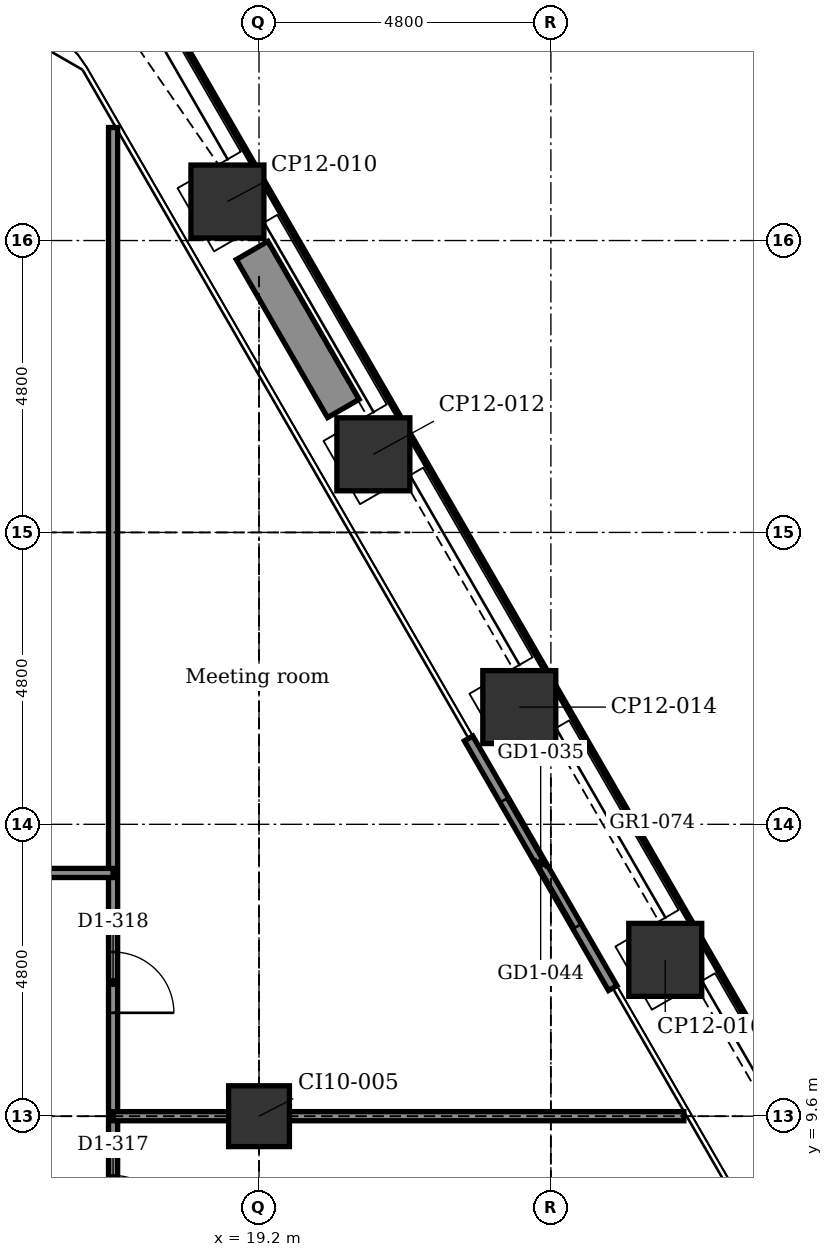
"""IFC4 building model, lengths in metres.
Left out: names, types, materials, properties, quantities, classifications, styles, units other than length and angle.
Written with IfcOpenShell. Run it as: python <this file> out.ifc"""

import sys

from ifc_helpers import new_model, si_unit, direction, frame, frame_2d, origin, origin_2d, place, context, subcontext, project, spatial, rectangle, extrude, element, fill, save


model = new_model("IFC4")
c1 = context("Model", 3, precision=1e-05, world=origin(), true_north=direction((0.0, 1.0)))
c2 = subcontext(c1, "Body", "Model", "MODEL_VIEW")
j1 = project(units=[si_unit("LENGTHUNIT", "METRE"), si_unit("PLANEANGLEUNIT", "RADIAN")], contexts=[c1])
p1 = place(None, origin())
s1 = spatial("IfcSite", under=j1, at=p1, CompositionType="ELEMENT")
p2 = place(p1, origin())
s2 = spatial("IfcBuilding", under=s1, at=p2, CompositionType="ELEMENT")
p3 = place(p2, frame((0.0, 0.0, 113.9)))
s3 = spatial("IfcBuildingStorey", under=s2, at=p3, CompositionType="ELEMENT", Elevation=113.9)
for number, where, z_axis, x_axis in (
    (1, (18.68, 24.642, -0.2), (0.0, 0.0, 1.0), (0.866, 0.5, 0.0)),
    (2, (21.08, 20.485, -0.2), (0.0, 0.0, 1.0), (0.866, 0.5, 0.0)),
    (3, (23.48, 16.328, -0.2), (0.0, 0.0, 1.0), (0.866, 0.5, 0.0)),
    (4, (25.88, 12.171, -0.2), (0.0, 0.0, 1.0), (0.866, 0.5, 0.0)),
):
    element("IfcColumn", number, at=place(p3, frame(where, z_axis=z_axis, x_axis=x_axis)), inside=s3, PredefinedType="COLUMN", context=c2, shape_type="SweptSolid", body=[
        extrude(rectangle(XDim=1.2, YDim=1.2, at=origin_2d()), origin(), (0.0, 0.0, 1.0), 4.5),
    ])
p4 = place(p3, frame((19.2, 9.6, -0.2), z_axis=(0.0, 0.0, 1.0), x_axis=(1.0, 0.0, 0.0)))
e5 = element("IfcColumn", 5, at=p4, inside=s3, PredefinedType="COLUMN", context=c2, shape_type="SweptSolid", body=[
    extrude(rectangle(XDim=1.0, YDim=1.0, at=origin_2d()), origin(), (0.0, 0.0, 1.0), 4.5),
])
p5 = place(p3, frame((22.647, 15.812, 0.0), z_axis=(0.0, 0.0, 1.0), x_axis=(0.499978080042, -0.866038058908, 0.0)))
e6 = element("IfcWall", 6, at=p5, inside=s3, PredefinedType="PARTITIONING", context=c2, shape_type="SweptSolid", body=[
    extrude(rectangle(XDim=4.74, YDim=0.16, at=frame_2d((2.37, 0.0))), origin(), (0.0, 0.0, 1.0), 4.3),
])
p6 = place(p5, frame((1.17, 0.0, 0.0)))
e7 = element("IfcOpeningElement", 7, at=p6, cuts=e6, PredefinedType="OPENING", context=c2, shape_type="SweptSolid", body=[
    extrude(rectangle(XDim=2.4, YDim=2.4, at=frame_2d((1.2, 1.2))), frame((0.0, 0.09, 0.0), z_axis=(0.0, -1.0, 0.0), x_axis=(1.0, 0.0, 0.0)), (0.0, 0.0, 1.0), 0.18),
])
p7 = place(p3, frame((19.087, 23.837, 0.0), z_axis=(0.0, 0.0, 1.0), x_axis=(0.499990139034, -0.866031096941, 0.0)))
e8 = element("IfcWall", 8, at=p7, inside=s3, PredefinedType="USERDEFINED", context=c2, shape_type="SweptSolid", body=[
    extrude(rectangle(XDim=3.0, YDim=0.6, at=frame_2d((1.5, 0.0))), origin(), (0.0, 0.0, 1.0), 0.7),
])
p8 = place(p3, frame((16.8, 3.95, 0.0), z_axis=(0.0, 0.0, 1.0), x_axis=(0.0, 1.0, 0.0)))
e9 = element("IfcWall", 9, at=p8, inside=s3, PredefinedType="PARTITIONING", context=c2, shape_type="SweptSolid", body=[
    extrude(rectangle(XDim=21.908, YDim=0.15, at=frame_2d((10.954, 0.0))), origin(), (0.0, 0.0, 1.0), 4.3),
])
p9 = place(p8, frame((0.95, 0.0, 0.0)))
e10 = element("IfcOpeningElement", 10, at=p9, cuts=e9, PredefinedType="OPENING", context=c2, shape_type="SweptSolid", body=[
    extrude(rectangle(XDim=1.0, YDim=2.1, at=frame_2d((0.5, 1.05))), frame((0.0, 0.085, 0.0), z_axis=(0.0, -1.0, 0.0), x_axis=(1.0, 0.0, 0.0)), (0.0, 0.0, 1.0), 0.17),
])
p10 = place(p8, frame((3.675, 0.0, 0.0)))
e11 = element("IfcOpeningElement", 11, at=p10, cuts=e9, PredefinedType="OPENING", context=c2, shape_type="SweptSolid", body=[
    extrude(rectangle(XDim=1.0, YDim=2.1, at=frame_2d((0.5, 1.05))), frame((0.0, 0.085, 0.0), z_axis=(0.0, -1.0, 0.0), x_axis=(1.0, 0.0, 0.0)), (0.0, 0.0, 1.0), 0.17),
])
p11 = place(p8, frame((7.35, 0.0, 0.0)))
e12 = element("IfcOpeningElement", 12, at=p11, cuts=e9, PredefinedType="OPENING", context=c2, shape_type="SweptSolid", body=[
    extrude(rectangle(XDim=1.0, YDim=2.1, at=frame_2d((0.5, 1.05))), frame((0.0, 0.085, 0.0), z_axis=(0.0, -1.0, 0.0), x_axis=(1.0, 0.0, 0.0)), (0.0, 0.0, 1.0), 0.17),
])
p12 = place(p3, frame((16.8, 9.6, 0.0), z_axis=(0.0, 0.0, 1.0), x_axis=(1.0, 0.0, 0.0)))
e13 = element("IfcWall", 13, at=p12, inside=s3, PredefinedType="PARTITIONING", context=c2, shape_type="SweptSolid", body=[
    extrude(rectangle(XDim=1.9, YDim=0.15, at=frame_2d((0.95, 0.0))), origin(), (0.0, 0.0, 1.0), 3.692),
])
p13 = place(p3, frame((19.7, 9.6, 0.0), z_axis=(0.0, 0.0, 1.0), x_axis=(1.0, 0.0, 0.0)))
e14 = element("IfcWall", 14, at=p13, inside=s3, PredefinedType="PARTITIONING", context=c2, shape_type="SweptSolid", body=[
    extrude(rectangle(XDim=6.487, YDim=0.15, at=frame_2d((3.243, 0.0))), origin(), (0.0, 0.0, 1.0), 3.692),
])
p14 = place(p3, frame((-16.8, 13.6, 0.0), z_axis=(0.0, 0.0, 1.0), x_axis=(1.0, 0.0, 0.0)))
e15 = element("IfcWall", 15, at=p14, inside=s3, PredefinedType="PARTITIONING", context=c2, shape_type="SweptSolid", body=[
    extrude(rectangle(XDim=33.6, YDim=0.15, at=frame_2d((16.8, 0.0))), origin(), (0.0, 0.0, 1.0), 4.3),
])
p15 = place(p14, frame((3.1, 0.0, 0.0)))
e16 = element("IfcOpeningElement", 16, at=p15, cuts=e15, PredefinedType="OPENING", context=c2, shape_type="SweptSolid", body=[
    extrude(rectangle(XDim=1.0, YDim=2.1, at=frame_2d((0.5, 1.05))), frame((0.0, 0.085, 0.0), z_axis=(0.0, -1.0, 0.0), x_axis=(1.0, 0.0, 0.0)), (0.0, 0.0, 1.0), 0.17),
])
p16 = place(p14, frame((9.1, 0.0, 0.0)))
e17 = element("IfcOpeningElement", 17, at=p16, cuts=e15, PredefinedType="OPENING", context=c2, shape_type="SweptSolid", body=[
    extrude(rectangle(XDim=1.0, YDim=2.1, at=frame_2d((0.5, 1.05))), frame((0.0, 0.085, 0.0), z_axis=(0.0, -1.0, 0.0), x_axis=(1.0, 0.0, 0.0)), (0.0, 0.0, 1.0), 0.17),
])
p17 = place(p14, frame((13.9, 0.0, 0.0)))
e18 = element("IfcOpeningElement", 18, at=p17, cuts=e15, PredefinedType="OPENING", context=c2, shape_type="SweptSolid", body=[
    extrude(rectangle(XDim=1.0, YDim=2.1, at=frame_2d((0.5, 1.05))), frame((0.0, 0.085, 0.0), z_axis=(0.0, -1.0, 0.0), x_axis=(1.0, 0.0, 0.0)), (0.0, 0.0, 1.0), 0.17),
])
p18 = place(p14, frame((18.7, 0.0, 0.0)))
e19 = element("IfcOpeningElement", 19, at=p18, cuts=e15, PredefinedType="OPENING", context=c2, shape_type="SweptSolid", body=[
    extrude(rectangle(XDim=1.0, YDim=2.1, at=frame_2d((0.5, 1.05))), frame((0.0, 0.085, 0.0), z_axis=(0.0, -1.0, 0.0), x_axis=(1.0, 0.0, 0.0)), (0.0, 0.0, 1.0), 0.17),
])
p19 = place(p14, frame((23.5, 0.0, 0.0)))
e20 = element("IfcOpeningElement", 20, at=p19, cuts=e15, PredefinedType="OPENING", context=c2, shape_type="SweptSolid", body=[
    extrude(rectangle(XDim=1.0, YDim=2.1, at=frame_2d((0.5, 1.05))), frame((0.0, 0.085, 0.0), z_axis=(0.0, -1.0, 0.0), x_axis=(1.0, 0.0, 0.0)), (0.0, 0.0, 1.0), 0.17),
])
p20 = place(p14, frame((29.5, 0.0, 0.0)))
e21 = element("IfcOpeningElement", 21, at=p20, cuts=e15, PredefinedType="OPENING", context=c2, shape_type="SweptSolid", body=[
    extrude(rectangle(XDim=1.0, YDim=2.1, at=frame_2d((0.5, 1.05))), frame((0.0, 0.085, 0.0), z_axis=(0.0, -1.0, 0.0), x_axis=(1.0, 0.0, 0.0)), (0.0, 0.0, 1.0), 0.17),
])
p21 = place(p6, origin())
e22 = element("IfcDoor", 22, at=p21, inside=s3, OperationType="DOUBLE_DOOR_SLIDING", PredefinedType="DOOR", context=c2, shape_type="SweptSolid", body=[
    extrude(rectangle(XDim=2.4, YDim=2.4, at=frame_2d((1.2, 1.2))), frame((0.0, 0.025, 0.0), z_axis=(0.0, -1.0, 0.0), x_axis=(1.0, 0.0, 0.0)), (0.0, 0.0, 1.0), 0.05),
])
fill(e7, e22)
p22 = place(p10, frame((1.0, 0.0, 0.0), z_axis=(0.0, 0.0, 1.0), x_axis=(-1.0, 0.0, 0.0)))
e23 = element("IfcDoor", 23, at=p22, inside=s3, OperationType="SINGLE_SWING_LEFT", PredefinedType="DOOR", context=c2, shape_type="SweptSolid", body=[
    extrude(rectangle(XDim=1.0, YDim=2.1, at=frame_2d((0.5, 1.05))), frame((0.0, 0.025, 0.0), z_axis=(0.0, -1.0, 0.0), x_axis=(1.0, 0.0, 0.0)), (0.0, 0.0, 1.0), 0.05),
])
fill(e11, e23)
p23 = place(p11, frame((1.0, 0.0, 0.0), z_axis=(0.0, 0.0, 1.0), x_axis=(-1.0, 0.0, 0.0)))
e24 = element("IfcDoor", 24, at=p23, inside=s3, OperationType="SINGLE_SWING_LEFT", PredefinedType="DOOR", context=c2, shape_type="SweptSolid", body=[
    extrude(rectangle(XDim=1.0, YDim=2.1, at=frame_2d((0.5, 1.05))), frame((0.0, 0.025, 0.0), z_axis=(0.0, -1.0, 0.0), x_axis=(1.0, 0.0, 0.0)), (0.0, 0.0, 1.0), 0.05),
])
fill(e12, e24)
save(model, sys.argv[1])
